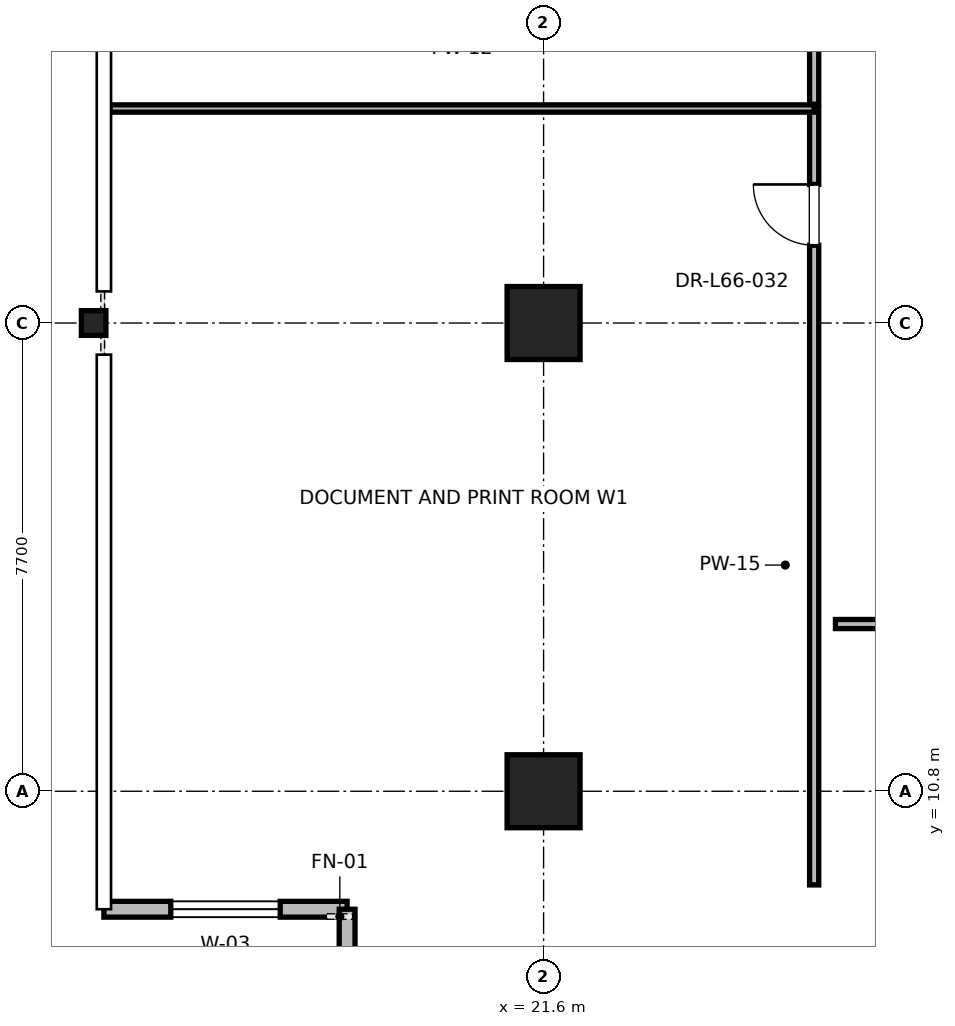
"""IFC4 building model, lengths in metres.
Left out: names, types, materials, properties, quantities, classifications, styles, units other than length and angle.
Written with IfcOpenShell. Run it as: python <this file> out.ifc"""

import sys

from ifc_helpers import new_model, si_unit, direction, frame, frame_2d, origin, origin_2d, place, context, subcontext, project, spatial, rectangle, i_section, extrude, element, fill, save


model = new_model("IFC4")
c1 = context("Model", 3, precision=1e-05, world=origin(), true_north=direction((0.0, 1.0)))
c2 = subcontext(c1, "Body", "Model", "MODEL_VIEW")
j1 = project(units=[si_unit("LENGTHUNIT", "METRE"), si_unit("PLANEANGLEUNIT", "RADIAN")], contexts=[c1])
p1 = place(None, origin())
s1 = spatial("IfcSite", under=j1, at=p1, CompositionType="ELEMENT")
p2 = place(p1, origin())
s2 = spatial("IfcBuilding", under=s1, at=p2, CompositionType="ELEMENT")
p3 = place(p2, frame((0.0, 0.0, 283.2)))
s3 = spatial("IfcBuildingStorey", under=s2, at=p3, CompositionType="ELEMENT", Elevation=283.2)
for number, where, z_axis, x_axis in (
    (1, (21.6, 18.5, 0.0), (0.0, 0.0, 1.0), (1.0, 0.0, 0.0)),
    (2, (21.6, 10.8, 0.0), (0.0, 0.0, 1.0), (1.0, 0.0, 0.0)),
):
    element("IfcColumn", number, at=place(p3, frame(where, z_axis=z_axis, x_axis=x_axis)), inside=s3, PredefinedType="COLUMN", context=c2, shape_type="SweptSolid", body=[
        extrude(rectangle(XDim=1.2, YDim=1.2, at=origin_2d()), origin(), (0.0, 0.0, 1.0), 4.0),
    ])
p4 = place(p3, frame((14.2, 18.5, 0.0), z_axis=(0.0, 0.0, 1.0), x_axis=(1.0, 0.0, 0.0)))
e3 = element("IfcColumn", 3, at=p4, inside=s3, PredefinedType="COLUMN", context=c2, shape_type="SweptSolid", body=[
    extrude(i_section(OverallWidth=0.403, OverallDepth=0.406, WebThickness=0.027, FlangeThickness=0.043, FilletRadius=0.015, at=origin_2d()), origin(), (0.0, 0.0, 1.0), 4.0),
])
p5 = place(p3, frame((14.369, 8.86, 0.0), z_axis=(0.0, 0.0, 1.0), x_axis=(1.0, 0.0, 0.0)))
e4 = element("IfcWall", 4, at=p5, inside=s3, PredefinedType="PARAPET", context=c2, shape_type="SweptSolid", body=[
    extrude(rectangle(XDim=4.0, YDim=0.26, at=frame_2d((2.0, 0.0))), origin(), (0.0, 0.0, 1.0), 3.785),
])
p6 = place(p5, frame((1.1, 0.0, 0.85)))
e5 = element("IfcOpeningElement", 5, at=p6, cuts=e4, PredefinedType="OPENING", context=c2, shape_type="SweptSolid", body=[
    extrude(rectangle(XDim=1.8, YDim=2.2, at=frame_2d((0.9, 1.1))), frame((0.0, 0.13, 0.0), z_axis=(0.0, -1.0, 0.0), x_axis=(1.0, 0.0, 0.0)), (0.0, 0.0, 1.0), 0.26),
])
p7 = place(p3, frame((18.369, 8.86, 0.0), z_axis=(0.0, 0.0, 1.0), x_axis=(0.0, -1.0, 0.0)))
e6 = element("IfcWall", 6, at=p7, inside=s3, PredefinedType="PARAPET", context=c2, shape_type="SweptSolid", body=[
    extrude(rectangle(XDim=3.5, YDim=0.26, at=frame_2d((1.75, 0.0))), origin(), (0.0, 0.0, 1.0), 3.785),
])
p8 = place(p3, frame((26.4, 13.55, 0.0), z_axis=(0.0, 0.0, 1.0), x_axis=(1.0, 0.0, 0.0)))
e7 = element("IfcWall", 7, at=p8, inside=s3, PredefinedType="PARTITIONING", context=c2, shape_type="SweptSolid", body=[
    extrude(rectangle(XDim=27.2, YDim=0.15, at=frame_2d((13.6, 0.0))), origin(), (0.0, 0.0, 1.0), 2.85),
])
p9 = place(p8, frame((13.1, 0.0, 0.0)))
e8 = element("IfcOpeningElement", 8, at=p9, cuts=e7, PredefinedType="OPENING", context=c2, shape_type="SweptSolid", body=[
    extrude(rectangle(XDim=1.0, YDim=2.15, at=frame_2d((0.5, 1.075))), frame((0.0, 0.075, 0.0), z_axis=(0.0, -1.0, 0.0), x_axis=(1.0, 0.0, 0.0)), (0.0, 0.0, 1.0), 0.15),
])
p10 = place(p3, frame((26.05, 9.26, 0.0), z_axis=(0.0, 0.0, 1.0), x_axis=(0.0, 1.0, 0.0)))
e9 = element("IfcWall", 9, at=p10, inside=s3, PredefinedType="PARTITIONING", context=c2, shape_type="SweptSolid", body=[
    extrude(rectangle(XDim=12.768, YDim=0.15, at=frame_2d((6.384, 0.0))), origin(), (0.0, 0.0, 1.0), 2.85),
])
p11 = place(p10, frame((10.519, 0.0, 0.0)))
e10 = element("IfcOpeningElement", 10, at=p11, cuts=e9, PredefinedType="OPENING", context=c2, shape_type="SweptSolid", body=[
    extrude(rectangle(XDim=1.0, YDim=2.15, at=frame_2d((0.5, 1.075))), frame((0.0, 0.075, 0.0), z_axis=(0.0, -1.0, 0.0), x_axis=(1.0, 0.0, 0.0)), (0.0, 0.0, 1.0), 0.15),
])
p12 = place(p3, frame((14.469, 22.028, 0.0), z_axis=(0.0, 0.0, 1.0), x_axis=(1.0, 0.0, 0.0)))
e11 = element("IfcWall", 11, at=p12, inside=s3, PredefinedType="PARTITIONING", context=c2, shape_type="SweptSolid", body=[
    extrude(rectangle(XDim=11.581, YDim=0.12, at=frame_2d((5.791, 0.0))), origin(), (0.0, 0.0, 1.0), 2.85),
])
p13 = place(p3, frame((26.05, 22.098, 0.0), z_axis=(0.0, 0.0, 1.0), x_axis=(0.0, 1.0, 0.0)))
e12 = element("IfcWall", 12, at=p13, inside=s3, PredefinedType="PARTITIONING", context=c2, shape_type="SweptSolid", body=[
    extrude(rectangle(XDim=12.333, YDim=0.15, at=frame_2d((6.167, 0.0))), origin(), (0.0, 0.0, 1.0), 2.85),
])
p14 = place(p13, frame((5.632, 0.0, 0.0)))
e13 = element("IfcOpeningElement", 13, at=p14, cuts=e12, PredefinedType="OPENING", context=c2, shape_type="SweptSolid", body=[
    extrude(rectangle(XDim=1.0, YDim=2.15, at=frame_2d((0.5, 1.075))), frame((0.0, 0.075, 0.0), z_axis=(0.0, -1.0, 0.0), x_axis=(1.0, 0.0, 0.0)), (0.0, 0.0, 1.0), 0.15),
])
p15 = place(p6, origin())
e14 = element("IfcWindow", 14, at=p15, inside=s3, PartitioningType="SINGLE_PANEL", PredefinedType="WINDOW", context=c2, shape_type="SweptSolid", body=[
    extrude(rectangle(XDim=1.8, YDim=2.2, at=frame_2d((0.9, 1.1))), frame((0.0, 0.03, 0.0), z_axis=(0.0, -1.0, 0.0), x_axis=(1.0, 0.0, 0.0)), (0.0, 0.0, 1.0), 0.06),
])
fill(e5, e14)
p16 = place(p11, origin())
e15 = element("IfcDoor", 15, at=p16, inside=s3, OperationType="SINGLE_SWING_RIGHT", PredefinedType="DOOR", context=c2, shape_type="SweptSolid", body=[
    extrude(rectangle(XDim=1.0, YDim=2.15, at=frame_2d((0.5, 1.075))), frame((0.0, 0.025, 0.0), z_axis=(0.0, -1.0, 0.0), x_axis=(1.0, 0.0, 0.0)), (0.0, 0.0, 1.0), 0.05),
])
fill(e10, e15)
save(model, sys.argv[1])
